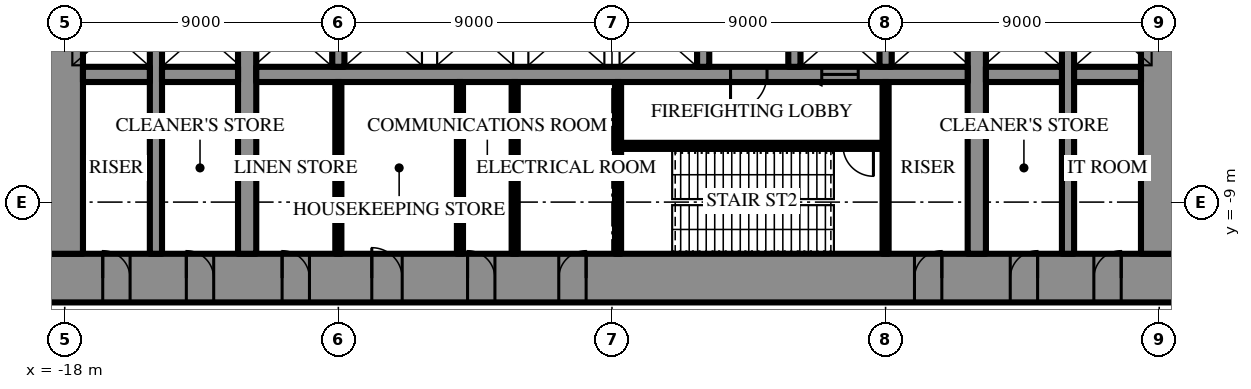
"""IFC4 building model, lengths in metres.
Left out: names, types, materials, properties, quantities, classifications, styles, units other than length and angle.
Written with IfcOpenShell. Run it as: python <this file> out.ifc"""

import sys

from ifc_helpers import new_model, si_unit, direction, frame, frame_2d, origin, place, context, subcontext, project, spatial, rectangle, extrude, element, fill, save


model = new_model("IFC4")
c1 = context("Model", 3, precision=1e-05, world=origin(), true_north=direction((0.0, 1.0)))
c2 = subcontext(c1, "Body", "Model", "MODEL_VIEW")
j1 = project(units=[si_unit("LENGTHUNIT", "METRE"), si_unit("PLANEANGLEUNIT", "RADIAN")], contexts=[c1])
p1 = place(None, origin())
s1 = spatial("IfcSite", under=j1, at=p1, CompositionType="ELEMENT")
p2 = place(p1, origin())
s2 = spatial("IfcBuilding", under=s1, at=p2, CompositionType="ELEMENT")
p3 = place(p2, origin())
s3 = spatial("IfcBuildingStorey", under=s2, at=p3, CompositionType="ELEMENT", Elevation=0.0)
p4 = place(p3, frame((18.6, -11.5, 0.0), z_axis=(0.0, 0.0, 1.0), x_axis=(-1.0, 0.0, 0.0)))
e1 = element("IfcWall", 1, at=p4, inside=s3, PredefinedType="SHEAR", context=c2, shape_type="SweptSolid", body=[
    extrude(rectangle(XDim=37.2, YDim=1.6, at=frame_2d((18.6, 0.0))), origin(), (0.0, 0.0, 1.0), 7.0),
])
p5 = place(p4, frame((19.45, 0.0, 0.0)))
e2 = element("IfcOpeningElement", 2, at=p5, cuts=e1, PredefinedType="OPENING", context=c2, shape_type="SweptSolid", body=[
    extrude(rectangle(XDim=0.9, YDim=2.2, at=frame_2d((0.45, 1.1))), frame((0.0, 0.81, 0.0), z_axis=(0.0, -1.0, 0.0), x_axis=(1.0, 0.0, 0.0)), (0.0, 0.0, 1.0), 1.62),
])
p6 = place(p4, frame((22.45, 0.0, 0.0)))
e3 = element("IfcOpeningElement", 3, at=p6, cuts=e1, PredefinedType="OPENING", context=c2, shape_type="SweptSolid", body=[
    extrude(rectangle(XDim=0.9, YDim=2.2, at=frame_2d((0.45, 1.1))), frame((0.0, 0.81, 0.0), z_axis=(0.0, -1.0, 0.0), x_axis=(1.0, 0.0, 0.0)), (0.0, 0.0, 1.0), 1.62),
])
p7 = place(p4, frame((25.5, 0.0, 0.0)))
e4 = element("IfcOpeningElement", 4, at=p7, cuts=e1, PredefinedType="OPENING", context=c2, shape_type="SweptSolid", body=[
    extrude(rectangle(XDim=1.0, YDim=2.2, at=frame_2d((0.5, 1.1))), frame((0.0, 0.81, 0.0), z_axis=(0.0, -1.0, 0.0), x_axis=(1.0, 0.0, 0.0)), (0.0, 0.0, 1.0), 1.62),
])
p8 = place(p4, frame((1.85, 0.0, 0.0)))
e5 = element("IfcOpeningElement", 5, at=p8, cuts=e1, PredefinedType="OPENING", context=c2, shape_type="SweptSolid", body=[
    extrude(rectangle(XDim=0.9, YDim=2.2, at=frame_2d((0.45, 1.1))), frame((0.0, 0.81, 0.0), z_axis=(0.0, -1.0, 0.0), x_axis=(1.0, 0.0, 0.0)), (0.0, 0.0, 1.0), 1.62),
])
p9 = place(p4, frame((4.6, 0.0, 0.0)))
e6 = element("IfcOpeningElement", 6, at=p9, cuts=e1, PredefinedType="OPENING", context=c2, shape_type="SweptSolid", body=[
    extrude(rectangle(XDim=0.9, YDim=2.2, at=frame_2d((0.45, 1.1))), frame((0.0, 0.81, 0.0), z_axis=(0.0, -1.0, 0.0), x_axis=(1.0, 0.0, 0.0)), (0.0, 0.0, 1.0), 1.62),
])
p10 = place(p4, frame((7.75, 0.0, 0.0)))
e7 = element("IfcOpeningElement", 7, at=p10, cuts=e1, PredefinedType="OPENING", context=c2, shape_type="SweptSolid", body=[
    extrude(rectangle(XDim=0.9, YDim=2.2, at=frame_2d((0.45, 1.1))), frame((0.0, 0.81, 0.0), z_axis=(0.0, -1.0, 0.0), x_axis=(1.0, 0.0, 0.0)), (0.0, 0.0, 1.0), 1.62),
])
p11 = place(p4, frame((28.55, 0.0, 0.0)))
e8 = element("IfcOpeningElement", 8, at=p11, cuts=e1, PredefinedType="OPENING", context=c2, shape_type="SweptSolid", body=[
    extrude(rectangle(XDim=0.9, YDim=2.2, at=frame_2d((0.45, 1.1))), frame((0.0, 0.81, 0.0), z_axis=(0.0, -1.0, 0.0), x_axis=(1.0, 0.0, 0.0)), (0.0, 0.0, 1.0), 1.62),
])
p12 = place(p4, frame((31.7, 0.0, 0.0)))
e9 = element("IfcOpeningElement", 9, at=p12, cuts=e1, PredefinedType="OPENING", context=c2, shape_type="SweptSolid", body=[
    extrude(rectangle(XDim=0.9, YDim=2.2, at=frame_2d((0.45, 1.1))), frame((0.0, 0.81, 0.0), z_axis=(0.0, -1.0, 0.0), x_axis=(1.0, 0.0, 0.0)), (0.0, 0.0, 1.0), 1.62),
])
p13 = place(p4, frame((34.45, 0.0, 0.0)))
e10 = element("IfcOpeningElement", 10, at=p13, cuts=e1, PredefinedType="OPENING", context=c2, shape_type="SweptSolid", body=[
    extrude(rectangle(XDim=0.9, YDim=2.2, at=frame_2d((0.45, 1.1))), frame((0.0, 0.81, 0.0), z_axis=(0.0, -1.0, 0.0), x_axis=(1.0, 0.0, 0.0)), (0.0, 0.0, 1.0), 1.62),
])
p14 = place(p3, frame((18.0, -10.7, 0.0), z_axis=(0.0, 0.0, 1.0), x_axis=(0.0, 1.0, 0.0)))
e11 = element("IfcWall", 11, at=p14, inside=s3, PredefinedType="SHEAR", context=c2, shape_type="SweptSolid", body=[
    extrude(rectangle(XDim=21.4, YDim=1.2, at=frame_2d((10.7, 0.0))), origin(), (0.0, 0.0, 1.0), 7.0),
])
p15 = place(p14, frame((9.8, 0.0, 0.0)))
e12 = element("IfcOpeningElement", 12, at=p15, cuts=e11, PredefinedType="OPENING", context=c2, shape_type="SweptSolid", body=[
    extrude(rectangle(XDim=1.8, YDim=2.4, at=frame_2d((0.9, 1.2))), frame((0.0, 0.61, 0.0), z_axis=(0.0, -1.0, 0.0), x_axis=(1.0, 0.0, 0.0)), (0.0, 0.0, 1.0), 1.22),
])
p16 = place(p3, frame((-18.0, 10.7, 0.0), z_axis=(0.0, 0.0, 1.0), x_axis=(0.0, -1.0, 0.0)))
e13 = element("IfcWall", 13, at=p16, inside=s3, PredefinedType="SHEAR", context=c2, shape_type="SweptSolid", body=[
    extrude(rectangle(XDim=21.4, YDim=1.2, at=frame_2d((10.7, 0.0))), origin(), (0.0, 0.0, 1.0), 7.0),
])
p17 = place(p16, frame((9.8, 0.0, 0.0)))
e14 = element("IfcOpeningElement", 14, at=p17, cuts=e13, PredefinedType="OPENING", context=c2, shape_type="SweptSolid", body=[
    extrude(rectangle(XDim=1.8, YDim=2.4, at=frame_2d((0.9, 1.2))), frame((0.0, 0.61, 0.0), z_axis=(0.0, -1.0, 0.0), x_axis=(1.0, 0.0, 0.0)), (0.0, 0.0, 1.0), 1.22),
])
p18 = place(p3, frame((12.0, -10.7, 0.0), z_axis=(0.0, 0.0, 1.0), x_axis=(0.0, 1.0, 0.0)))
e15 = element("IfcWall", 15, at=p18, inside=s3, PredefinedType="SHEAR", context=c2, shape_type="SweptSolid", body=[
    extrude(rectangle(XDim=21.4, YDim=0.6, at=frame_2d((10.7, 0.0))), origin(), (0.0, 0.0, 1.0), 7.0),
])
p19 = place(p18, frame((9.8, 0.0, 0.0)))
e16 = element("IfcOpeningElement", 16, at=p19, cuts=e15, PredefinedType="OPENING", context=c2, shape_type="SweptSolid", body=[
    extrude(rectangle(XDim=1.8, YDim=2.4, at=frame_2d((0.9, 1.2))), frame((0.0, 0.31, 0.0), z_axis=(0.0, -1.0, 0.0), x_axis=(1.0, 0.0, 0.0)), (0.0, 0.0, 1.0), 0.62),
])
p20 = place(p3, frame((-12.0, -10.7, 0.0), z_axis=(0.0, 0.0, 1.0), x_axis=(0.0, 1.0, 0.0)))
e17 = element("IfcWall", 17, at=p20, inside=s3, PredefinedType="SHEAR", context=c2, shape_type="SweptSolid", body=[
    extrude(rectangle(XDim=21.4, YDim=0.6, at=frame_2d((10.7, 0.0))), origin(), (0.0, 0.0, 1.0), 7.0),
])
p21 = place(p20, frame((9.8, 0.0, 0.0)))
e18 = element("IfcOpeningElement", 18, at=p21, cuts=e17, PredefinedType="OPENING", context=c2, shape_type="SweptSolid", body=[
    extrude(rectangle(XDim=1.8, YDim=2.4, at=frame_2d((0.9, 1.2))), frame((0.0, 0.31, 0.0), z_axis=(0.0, -1.0, 0.0), x_axis=(1.0, 0.0, 0.0)), (0.0, 0.0, 1.0), 0.62),
])
p22 = place(p3, frame((15.0, -10.7, 0.0), z_axis=(0.0, 0.0, 1.0), x_axis=(0.0, 1.0, 0.0)))
e19 = element("IfcWall", 19, at=p22, inside=s3, PredefinedType="SHEAR", context=c2, shape_type="SweptSolid", body=[
    extrude(rectangle(XDim=21.4, YDim=0.4, at=frame_2d((10.7, 0.0))), origin(), (0.0, 0.0, 1.0), 7.0),
])
p23 = place(p22, frame((9.8, 0.0, 0.0)))
e20 = element("IfcOpeningElement", 20, at=p23, cuts=e19, PredefinedType="OPENING", context=c2, shape_type="SweptSolid", body=[
    extrude(rectangle(XDim=1.8, YDim=2.4, at=frame_2d((0.9, 1.2))), frame((0.0, 0.21, 0.0), z_axis=(0.0, -1.0, 0.0), x_axis=(1.0, 0.0, 0.0)), (0.0, 0.0, 1.0), 0.42),
])
p24 = place(p3, frame((-15.0, -10.7, 0.0), z_axis=(0.0, 0.0, 1.0), x_axis=(0.0, 1.0, 0.0)))
e21 = element("IfcWall", 21, at=p24, inside=s3, PredefinedType="SHEAR", context=c2, shape_type="SweptSolid", body=[
    extrude(rectangle(XDim=21.4, YDim=0.4, at=frame_2d((10.7, 0.0))), origin(), (0.0, 0.0, 1.0), 7.0),
])
p25 = place(p24, frame((9.8, 0.0, 0.0)))
e22 = element("IfcOpeningElement", 22, at=p25, cuts=e21, PredefinedType="OPENING", context=c2, shape_type="SweptSolid", body=[
    extrude(rectangle(XDim=1.8, YDim=2.4, at=frame_2d((0.9, 1.2))), frame((0.0, 0.21, 0.0), z_axis=(0.0, -1.0, 0.0), x_axis=(1.0, 0.0, 0.0)), (0.0, 0.0, 1.0), 0.42),
])
p26 = place(p3, frame((17.4, -4.8, 0.0), z_axis=(0.0, 0.0, 1.0), x_axis=(-1.0, 0.0, 0.0)))
e23 = element("IfcWall", 23, at=p26, inside=s3, PredefinedType="SHEAR", context=c2, shape_type="SweptSolid", body=[
    extrude(rectangle(XDim=2.2, YDim=0.5, at=frame_2d((1.1, 0.0))), origin(), (0.0, 0.0, 1.0), 7.0),
])
p27 = place(p3, frame((14.8, -4.8, 0.0), z_axis=(0.0, 0.0, 1.0), x_axis=(-1.0, 0.0, 0.0)))
e24 = element("IfcWall", 24, at=p27, inside=s3, PredefinedType="SHEAR", context=c2, shape_type="SweptSolid", body=[
    extrude(rectangle(XDim=2.5, YDim=0.5, at=frame_2d((1.25, 0.0))), origin(), (0.0, 0.0, 1.0), 7.0),
])
p28 = place(p3, frame((11.7, -4.8, 0.0), z_axis=(0.0, 0.0, 1.0), x_axis=(-1.0, 0.0, 0.0)))
e25 = element("IfcWall", 25, at=p28, inside=s3, PredefinedType="SHEAR", context=c2, shape_type="SweptSolid", body=[
    extrude(rectangle(XDim=23.4, YDim=0.5, at=frame_2d((11.7, 0.0))), origin(), (0.0, 0.0, 1.0), 7.0),
])
p29 = place(p28, frame((6.6, 0.0, 0.0)))
e26 = element("IfcOpeningElement", 26, at=p29, cuts=e25, PredefinedType="OPENING", context=c2, shape_type="SweptSolid", body=[
    extrude(rectangle(XDim=1.2, YDim=2.2, at=frame_2d((0.6, 1.1))), frame((0.0, 0.26, 0.0), z_axis=(0.0, -1.0, 0.0), x_axis=(1.0, 0.0, 0.0)), (0.0, 0.0, 1.0), 0.52),
])
p30 = place(p28, frame((3.6, 0.0, 0.0)))
e27 = element("IfcOpeningElement", 27, at=p30, cuts=e25, PredefinedType="OPENING", context=c2, shape_type="SweptSolid", body=[
    extrude(rectangle(XDim=1.2, YDim=2.2, at=frame_2d((0.6, 1.1))), frame((0.0, 0.26, 0.0), z_axis=(0.0, -1.0, 0.0), x_axis=(1.0, 0.0, 0.0)), (0.0, 0.0, 1.0), 0.52),
])
p31 = place(p3, frame((-12.3, -4.8, 0.0), z_axis=(0.0, 0.0, 1.0), x_axis=(-1.0, 0.0, 0.0)))
e28 = element("IfcWall", 28, at=p31, inside=s3, PredefinedType="SHEAR", context=c2, shape_type="SweptSolid", body=[
    extrude(rectangle(XDim=2.5, YDim=0.5, at=frame_2d((1.25, 0.0))), origin(), (0.0, 0.0, 1.0), 7.0),
])
p32 = place(p3, frame((-15.2, -4.8, 0.0), z_axis=(0.0, 0.0, 1.0), x_axis=(-1.0, 0.0, 0.0)))
e29 = element("IfcWall", 29, at=p32, inside=s3, PredefinedType="SHEAR", context=c2, shape_type="SweptSolid", body=[
    extrude(rectangle(XDim=2.2, YDim=0.5, at=frame_2d((1.1, 0.0))), origin(), (0.0, 0.0, 1.0), 7.0),
])
for number, where, z_axis, x_axis in (
    (30, (9.0, -2.25, 0.0), (0.0, 0.0, 1.0), (0.0, -1.0, 0.0)),
    (31, (6.0, -2.25, 0.0), (0.0, 0.0, 1.0), (0.0, -1.0, 0.0)),
    (32, (3.0, -2.25, 0.0), (0.0, 0.0, 1.0), (0.0, -1.0, 0.0)),
    (33, (-9.0, -2.25, 0.0), (0.0, 0.0, 1.0), (0.0, -1.0, 0.0)),
):
    element("IfcWall", number, at=place(p3, frame(where, z_axis=z_axis, x_axis=x_axis)), inside=s3, PredefinedType="SHEAR", context=c2, shape_type="SweptSolid", body=[
        extrude(rectangle(XDim=2.3, YDim=0.4, at=frame_2d((1.15, 0.0))), origin(), (0.0, 0.0, 1.0), 7.0),
    ])
p33 = place(p3, frame((0.2, -5.05, 0.0), z_axis=(0.0, 0.0, 1.0), x_axis=(0.0, -1.0, 0.0)))
e34 = element("IfcWall", 34, at=p33, inside=s3, PredefinedType="SHEAR", context=c2, shape_type="SweptSolid", body=[
    extrude(rectangle(XDim=5.65, YDim=0.2, at=frame_2d((2.825, 0.0))), origin(), (0.0, 0.0, 1.0), 7.0),
])
p34 = place(p3, frame((8.9, -7.15, 0.0), z_axis=(0.0, 0.0, 1.0), x_axis=(-1.0, 0.0, 0.0)))
e35 = element("IfcWall", 35, at=p34, inside=s3, PredefinedType="SHEAR", context=c2, shape_type="SweptSolid", body=[
    extrude(rectangle(XDim=8.6, YDim=0.2, at=frame_2d((4.3, 0.0))), origin(), (0.0, 0.0, 1.0), 7.0),
])
p35 = place(p34, frame((0.3, 0.0, 0.0)))
e36 = element("IfcOpeningElement", 36, at=p35, cuts=e35, PredefinedType="OPENING", context=c2, shape_type="SweptSolid", body=[
    extrude(rectangle(XDim=1.0, YDim=2.2, at=frame_2d((0.5, 1.1))), frame((0.0, 0.11, 0.0), z_axis=(0.0, -1.0, 0.0), x_axis=(1.0, 0.0, 0.0)), (0.0, 0.0, 1.0), 0.22),
])
for number, where, z_axis, x_axis in (
    (37, (9.0, -5.05, 0.0), (0.0, 0.0, 1.0), (0.0, -1.0, 0.0)),
    (38, (-9.0, -5.05, 0.0), (0.0, 0.0, 1.0), (0.0, -1.0, 0.0)),
    (39, (-3.2, -5.05, 0.0), (0.0, 0.0, 1.0), (0.0, -1.0, 0.0)),
    (40, (-5.0, -5.05, 0.0), (0.0, 0.0, 1.0), (0.0, -1.0, 0.0)),
):
    element("IfcWall", number, at=place(p3, frame(where, z_axis=z_axis, x_axis=x_axis)), inside=s3, PredefinedType="PARTITIONING", context=c2, shape_type="SweptSolid", body=[
        extrude(rectangle(XDim=5.65, YDim=0.2, at=frame_2d((2.825, 0.0))), origin(), (0.0, 0.0, 1.0), 6.65),
    ])
p36 = place(p29, origin())
e41 = element("IfcDoor", 41, at=p36, inside=s3, OperationType="SINGLE_SWING_LEFT", PredefinedType="DOOR", context=c2, shape_type="SweptSolid", body=[
    extrude(rectangle(XDim=1.2, YDim=2.2, at=frame_2d((0.6, 1.1))), frame((0.0, 0.025, 0.0), z_axis=(0.0, -1.0, 0.0), x_axis=(1.0, 0.0, 0.0)), (0.0, 0.0, 1.0), 0.05),
])
fill(e26, e41)
p37 = place(p35, origin())
e42 = element("IfcDoor", 42, at=p37, inside=s3, OperationType="SINGLE_SWING_RIGHT", PredefinedType="DOOR", context=c2, shape_type="SweptSolid", body=[
    extrude(rectangle(XDim=1.0, YDim=2.2, at=frame_2d((0.5, 1.1))), frame((0.0, 0.025, 0.0), z_axis=(0.0, -1.0, 0.0), x_axis=(1.0, 0.0, 0.0)), (0.0, 0.0, 1.0), 0.05),
])
fill(e36, e42)
p38 = place(p5, frame((0.9, 0.0, 0.0), z_axis=(0.0, 0.0, 1.0), x_axis=(-1.0, 0.0, 0.0)))
e43 = element("IfcDoor", 43, at=p38, inside=s3, OperationType="SINGLE_SWING_LEFT", PredefinedType="DOOR", context=c2, shape_type="SweptSolid", body=[
    extrude(rectangle(XDim=0.9, YDim=2.2, at=frame_2d((0.45, 1.1))), frame((0.0, 0.025, 0.0), z_axis=(0.0, -1.0, 0.0), x_axis=(1.0, 0.0, 0.0)), (0.0, 0.0, 1.0), 0.05),
])
fill(e2, e43)
p39 = place(p6, frame((0.9, 0.0, 0.0), z_axis=(0.0, 0.0, 1.0), x_axis=(-1.0, 0.0, 0.0)))
e44 = element("IfcDoor", 44, at=p39, inside=s3, OperationType="SINGLE_SWING_RIGHT", PredefinedType="DOOR", context=c2, shape_type="SweptSolid", body=[
    extrude(rectangle(XDim=0.9, YDim=2.2, at=frame_2d((0.45, 1.1))), frame((0.0, 0.025, 0.0), z_axis=(0.0, -1.0, 0.0), x_axis=(1.0, 0.0, 0.0)), (0.0, 0.0, 1.0), 0.05),
])
fill(e3, e44)
p40 = place(p7, frame((1.0, 0.0, 0.0), z_axis=(0.0, 0.0, 1.0), x_axis=(-1.0, 0.0, 0.0)))
e45 = element("IfcDoor", 45, at=p40, inside=s3, OperationType="SINGLE_SWING_RIGHT", PredefinedType="DOOR", context=c2, shape_type="SweptSolid", body=[
    extrude(rectangle(XDim=1.0, YDim=2.2, at=frame_2d((0.5, 1.1))), frame((0.0, 0.025, 0.0), z_axis=(0.0, -1.0, 0.0), x_axis=(1.0, 0.0, 0.0)), (0.0, 0.0, 1.0), 0.05),
])
fill(e4, e45)
p41 = place(p8, frame((0.9, 0.0, 0.0), z_axis=(0.0, 0.0, 1.0), x_axis=(-1.0, 0.0, 0.0)))
e46 = element("IfcDoor", 46, at=p41, inside=s3, OperationType="SINGLE_SWING_LEFT", PredefinedType="DOOR", context=c2, shape_type="SweptSolid", body=[
    extrude(rectangle(XDim=0.9, YDim=2.2, at=frame_2d((0.45, 1.1))), frame((0.0, 0.025, 0.0), z_axis=(0.0, -1.0, 0.0), x_axis=(1.0, 0.0, 0.0)), (0.0, 0.0, 1.0), 0.05),
])
fill(e5, e46)
p42 = place(p9, frame((0.9, 0.0, 0.0), z_axis=(0.0, 0.0, 1.0), x_axis=(-1.0, 0.0, 0.0)))
e47 = element("IfcDoor", 47, at=p42, inside=s3, OperationType="SINGLE_SWING_LEFT", PredefinedType="DOOR", context=c2, shape_type="SweptSolid", body=[
    extrude(rectangle(XDim=0.9, YDim=2.2, at=frame_2d((0.45, 1.1))), frame((0.0, 0.025, 0.0), z_axis=(0.0, -1.0, 0.0), x_axis=(1.0, 0.0, 0.0)), (0.0, 0.0, 1.0), 0.05),
])
fill(e6, e47)
p43 = place(p10, frame((0.9, 0.0, 0.0), z_axis=(0.0, 0.0, 1.0), x_axis=(-1.0, 0.0, 0.0)))
e48 = element("IfcDoor", 48, at=p43, inside=s3, OperationType="SINGLE_SWING_LEFT", PredefinedType="DOOR", context=c2, shape_type="SweptSolid", body=[
    extrude(rectangle(XDim=0.9, YDim=2.2, at=frame_2d((0.45, 1.1))), frame((0.0, 0.025, 0.0), z_axis=(0.0, -1.0, 0.0), x_axis=(1.0, 0.0, 0.0)), (0.0, 0.0, 1.0), 0.05),
])
fill(e7, e48)
p44 = place(p11, frame((0.9, 0.0, 0.0), z_axis=(0.0, 0.0, 1.0), x_axis=(-1.0, 0.0, 0.0)))
e49 = element("IfcDoor", 49, at=p44, inside=s3, OperationType="SINGLE_SWING_RIGHT", PredefinedType="DOOR", context=c2, shape_type="SweptSolid", body=[
    extrude(rectangle(XDim=0.9, YDim=2.2, at=frame_2d((0.45, 1.1))), frame((0.0, 0.025, 0.0), z_axis=(0.0, -1.0, 0.0), x_axis=(1.0, 0.0, 0.0)), (0.0, 0.0, 1.0), 0.05),
])
fill(e8, e49)
p45 = place(p12, frame((0.9, 0.0, 0.0), z_axis=(0.0, 0.0, 1.0), x_axis=(-1.0, 0.0, 0.0)))
e50 = element("IfcDoor", 50, at=p45, inside=s3, OperationType="SINGLE_SWING_RIGHT", PredefinedType="DOOR", context=c2, shape_type="SweptSolid", body=[
    extrude(rectangle(XDim=0.9, YDim=2.2, at=frame_2d((0.45, 1.1))), frame((0.0, 0.025, 0.0), z_axis=(0.0, -1.0, 0.0), x_axis=(1.0, 0.0, 0.0)), (0.0, 0.0, 1.0), 0.05),
])
fill(e9, e50)
p46 = place(p13, frame((0.9, 0.0, 0.0), z_axis=(0.0, 0.0, 1.0), x_axis=(-1.0, 0.0, 0.0)))
e51 = element("IfcDoor", 51, at=p46, inside=s3, OperationType="SINGLE_SWING_RIGHT", PredefinedType="DOOR", context=c2, shape_type="SweptSolid", body=[
    extrude(rectangle(XDim=0.9, YDim=2.2, at=frame_2d((0.45, 1.1))), frame((0.0, 0.025, 0.0), z_axis=(0.0, -1.0, 0.0), x_axis=(1.0, 0.0, 0.0)), (0.0, 0.0, 1.0), 0.05),
])
fill(e10, e51)
p47 = place(p30, origin())
e52 = element("IfcDoor", 52, at=p47, inside=s3, OperationType="SLIDING_TO_LEFT", PredefinedType="DOOR", context=c2, shape_type="SweptSolid", body=[
    extrude(rectangle(XDim=1.2, YDim=2.2, at=frame_2d((0.6, 1.1))), frame((0.0, 0.025, 0.0), z_axis=(0.0, -1.0, 0.0), x_axis=(1.0, 0.0, 0.0)), (0.0, 0.0, 1.0), 0.05),
])
fill(e27, e52)
save(model, sys.argv[1])
